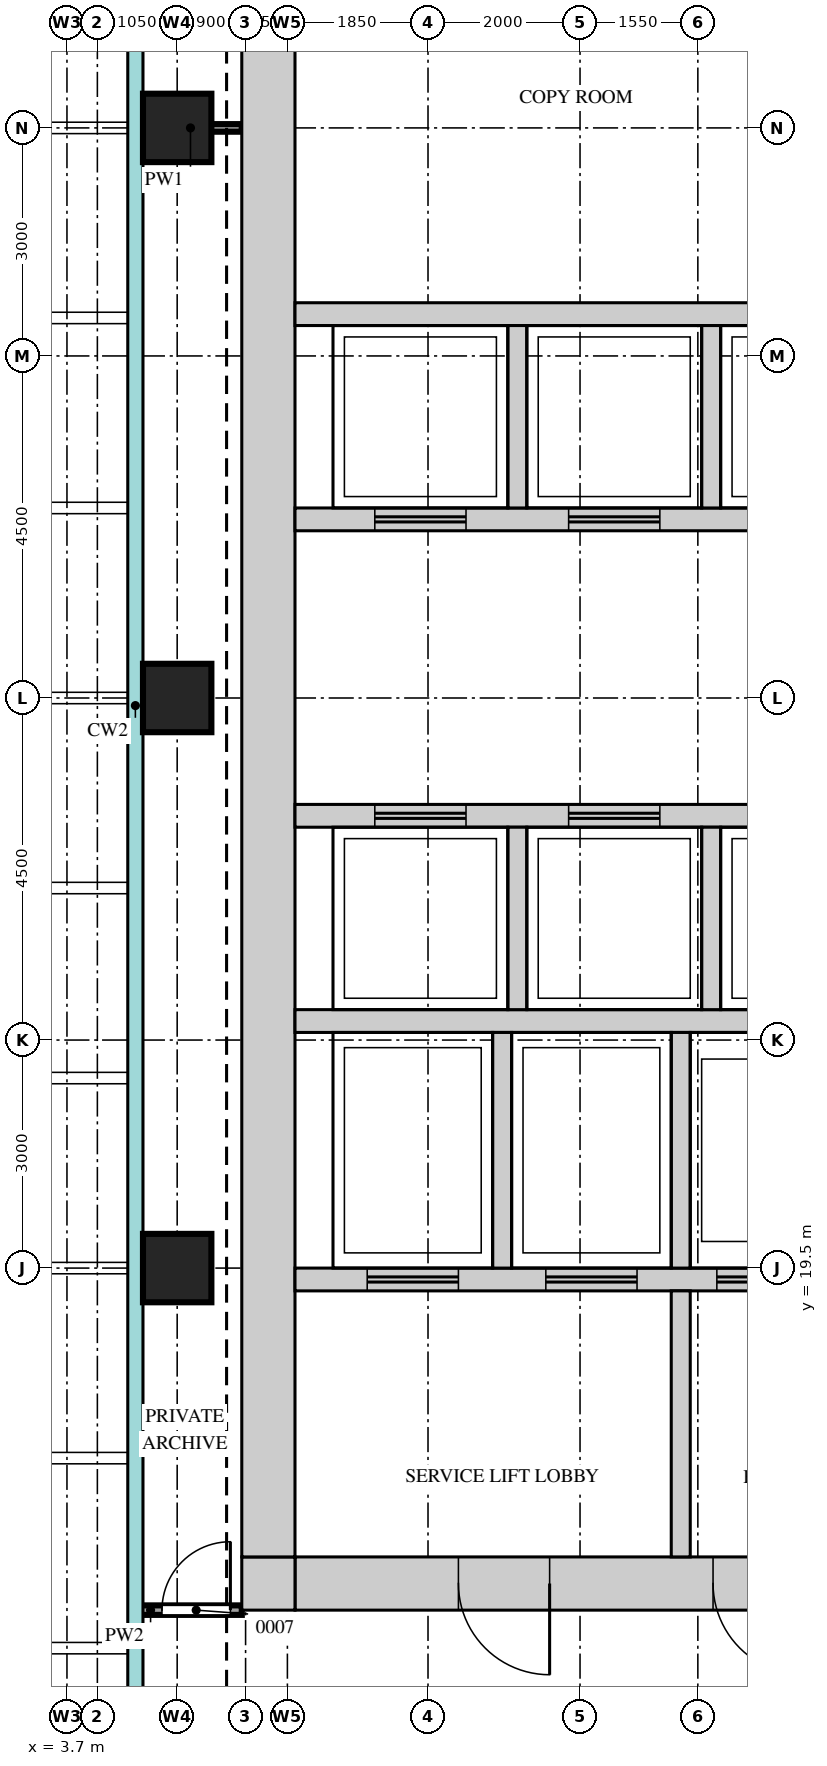
"""IFC4 building model, lengths in metres.
Left out: names, types, materials, properties, quantities, classifications, styles, units other than length and angle.
Written with IfcOpenShell. Run it as: python <this file> out.ifc"""

import sys

from ifc_helpers import new_model, si_unit, direction, frame, frame_2d, origin, origin_2d, place, context, subcontext, project, spatial, rectangle, extrude, source, transform, mapped, element, fill, save


model = new_model("IFC4")
c1 = context("Model", 3, precision=1e-05, world=origin(), true_north=direction((0.0, 1.0)))
c2 = subcontext(c1, "Body", "Model", "MODEL_VIEW")
j1 = project(units=[si_unit("LENGTHUNIT", "METRE"), si_unit("PLANEANGLEUNIT", "RADIAN")], contexts=[c1])
p1 = place(None, origin())
s1 = spatial("IfcSite", under=j1, at=p1, CompositionType="ELEMENT")
p2 = place(p1, origin())
s2 = spatial("IfcBuilding", under=s1, at=p2, CompositionType="ELEMENT")
p3 = place(p2, frame((0.0, 0.0, 266.2)))
s3 = spatial("IfcBuildingStorey", under=s2, at=p3, CompositionType="ELEMENT", Elevation=266.2)
m1 = source(origin(), c2, "Body", "SweptSolid", [
    extrude(rectangle(XDim=13.6, YDim=0.7, at=frame_2d((6.8, 0.0))), origin(), (0.0, 0.0, 1.0), 3.75),
])
p4 = place(p3, frame((6.7, 15.35, 0.0), z_axis=(0.0, 0.0, 1.0), x_axis=(1.0, 0.0, 0.0)))
e1 = element("IfcWall", 1, at=p4, inside=s3, PredefinedType="SHEAR", context=c2, shape_type="MappedRepresentation", body=[
    mapped(m1, transform((0.0, 0.0, 0.0))),
])
m2 = source(origin(), c2, "Body", "SweptSolid", [
    extrude(rectangle(XDim=1.2, YDim=2.1, at=frame_2d((0.6, 1.05))), frame((0.0, 0.36, 0.0), z_axis=(0.0, -1.0, 0.0), x_axis=(1.0, 0.0, 0.0)), (0.0, 0.0, 1.0), 0.72),
])
p5 = place(p4, frame((5.5, 0.0, 0.0)))
e2 = element("IfcOpeningElement", 2, at=p5, cuts=e1, PredefinedType="OPENING", context=c2, shape_type="MappedRepresentation", body=[
    mapped(m2, transform((0.0, 0.0, 0.0))),
])
p6 = place(p4, frame((2.15, 0.0, 0.0)))
e3 = element("IfcOpeningElement", 3, at=p6, cuts=e1, PredefinedType="OPENING", context=c2, shape_type="MappedRepresentation", body=[
    mapped(m2, transform((0.0, 0.0, 0.0))),
])
m3 = source(origin(), c2, "Body", "SweptSolid", [
    extrude(rectangle(XDim=1.0, YDim=2.1, at=frame_2d((0.5, 1.05))), frame((0.0, 0.36, 0.0), z_axis=(0.0, -1.0, 0.0), x_axis=(1.0, 0.0, 0.0)), (0.0, 0.0, 1.0), 0.72),
])
p7 = place(p4, frame((8.0, 0.0, 0.0)))
e4 = element("IfcOpeningElement", 4, at=p7, cuts=e1, PredefinedType="OPENING", context=c2, shape_type="MappedRepresentation", body=[
    mapped(m3, transform((0.0, 0.0, 0.0))),
])
m4 = source(origin(), c2, "Body", "SweptSolid", [
    extrude(rectangle(XDim=0.7, YDim=0.7, at=frame_2d((0.35, 0.0))), origin(), (0.0, 0.0, 1.0), 3.75),
])
p8 = place(p3, frame((6.0, 15.35, 0.0), z_axis=(0.0, 0.0, 1.0), x_axis=(1.0, 0.0, 0.0)))
e5 = element("IfcWall", 5, at=p8, inside=s3, PredefinedType="SHEAR", context=c2, shape_type="MappedRepresentation", body=[
    mapped(m4, transform((0.0, 0.0, 0.0))),
])
m5 = source(origin(), c2, "Body", "SweptSolid", [
    extrude(rectangle(XDim=22.6, YDim=0.7, at=frame_2d((11.3, 0.0))), origin(), (0.0, 0.0, 1.0), 3.75),
])
p9 = place(p3, frame((6.35, 15.7, 0.0), z_axis=(0.0, 0.0, 1.0), x_axis=(0.0, 1.0, 0.0)))
e6 = element("IfcWall", 6, at=p9, inside=s3, PredefinedType="SHEAR", context=c2, shape_type="MappedRepresentation", body=[
    mapped(m5, transform((0.0, 0.0, 0.0))),
])
m6 = source(origin(), c2, "Body", "SweptSolid", [
    extrude(rectangle(XDim=13.6, YDim=0.3, at=frame_2d((6.8, 0.0))), origin(), (0.0, 0.0, 1.0), 3.75),
])
p10 = place(p3, frame((6.7, 22.75, 0.0), z_axis=(0.0, 0.0, 1.0), x_axis=(1.0, 0.0, 0.0)))
e7 = element("IfcWall", 7, at=p10, inside=s3, PredefinedType="STANDARD", context=c2, shape_type="MappedRepresentation", body=[
    mapped(m6, transform((0.0, 0.0, 0.0))),
])
m7 = source(origin(), c2, "Body", "SweptSolid", [
    extrude(rectangle(XDim=9.375, YDim=0.3, at=frame_2d((4.688, 0.0))), origin(), (0.0, 0.0, 1.0), 3.75),
])
p11 = place(p3, frame((6.7, 19.35, 0.0), z_axis=(0.0, 0.0, 1.0), x_axis=(1.0, 0.0, 0.0)))
e8 = element("IfcWall", 8, at=p11, inside=s3, PredefinedType="STANDARD", context=c2, shape_type="MappedRepresentation", body=[
    mapped(m7, transform((0.0, 0.0, 0.0))),
])
m8 = source(origin(), c2, "Body", "SweptSolid", [
    extrude(rectangle(XDim=1.2, YDim=2.1, at=frame_2d((0.6, 1.05))), frame((0.0, 0.16, 0.0), z_axis=(0.0, -1.0, 0.0), x_axis=(1.0, 0.0, 0.0)), (0.0, 0.0, 1.0), 0.32),
])
p12 = place(p11, frame((0.95, 0.0, 0.0)))
e9 = element("IfcOpeningElement", 9, at=p12, cuts=e8, PredefinedType="OPENING", context=c2, shape_type="MappedRepresentation", body=[
    mapped(m8, transform((0.0, 0.0, 0.0))),
])
p13 = place(p11, frame((3.3, 0.0, 0.0)))
e10 = element("IfcOpeningElement", 10, at=p13, cuts=e8, PredefinedType="OPENING", context=c2, shape_type="MappedRepresentation", body=[
    mapped(m8, transform((0.0, 0.0, 0.0))),
])
p14 = place(p11, frame((5.55, 0.0, 0.0)))
e11 = element("IfcOpeningElement", 11, at=p14, cuts=e8, PredefinedType="OPENING", context=c2, shape_type="MappedRepresentation", body=[
    mapped(m8, transform((0.0, 0.0, 0.0))),
])
p15 = place(p11, frame((7.7, 0.0, 0.0)))
e12 = element("IfcOpeningElement", 12, at=p15, cuts=e8, PredefinedType="OPENING", context=c2, shape_type="MappedRepresentation", body=[
    mapped(m8, transform((0.0, 0.0, 0.0))),
])
m9 = source(origin(), c2, "Body", "SweptSolid", [
    extrude(rectangle(XDim=8.15, YDim=0.3, at=frame_2d((4.075, 0.0))), origin(), (0.0, 0.0, 1.0), 3.75),
])
p16 = place(p3, frame((6.7, 32.05, 0.0), z_axis=(0.0, 0.0, 1.0), x_axis=(1.0, 0.0, 0.0)))
e13 = element("IfcWall", 13, at=p16, inside=s3, PredefinedType="STANDARD", context=c2, shape_type="MappedRepresentation", body=[
    mapped(m9, transform((0.0, 0.0, 0.0))),
])
p17 = place(p3, frame((6.7, 29.35, 0.0), z_axis=(0.0, 0.0, 1.0), x_axis=(1.0, 0.0, 0.0)))
e14 = element("IfcWall", 14, at=p17, inside=s3, PredefinedType="STANDARD", context=c2, shape_type="MappedRepresentation", body=[
    mapped(m9, transform((0.0, 0.0, 0.0))),
])
p18 = place(p17, frame((1.05, 0.0, 0.0)))
e15 = element("IfcOpeningElement", 15, at=p18, cuts=e14, PredefinedType="OPENING", context=c2, shape_type="MappedRepresentation", body=[
    mapped(m8, transform((0.0, 0.0, 0.0))),
])
p19 = place(p17, frame((3.6, 0.0, 0.0)))
e16 = element("IfcOpeningElement", 16, at=p19, cuts=e14, PredefinedType="OPENING", context=c2, shape_type="MappedRepresentation", body=[
    mapped(m8, transform((0.0, 0.0, 0.0))),
])
p20 = place(p17, frame((6.15, 0.0, 0.0)))
e17 = element("IfcOpeningElement", 17, at=p20, cuts=e14, PredefinedType="OPENING", context=c2, shape_type="MappedRepresentation", body=[
    mapped(m8, transform((0.0, 0.0, 0.0))),
])
p21 = place(p3, frame((6.7, 25.45, 0.0), z_axis=(0.0, 0.0, 1.0), x_axis=(1.0, 0.0, 0.0)))
e18 = element("IfcWall", 18, at=p21, inside=s3, PredefinedType="STANDARD", context=c2, shape_type="MappedRepresentation", body=[
    mapped(m9, transform((0.0, 0.0, 0.0))),
])
p22 = place(p21, frame((1.05, 0.0, 0.0)))
e19 = element("IfcOpeningElement", 19, at=p22, cuts=e18, PredefinedType="OPENING", context=c2, shape_type="MappedRepresentation", body=[
    mapped(m8, transform((0.0, 0.0, 0.0))),
])
p23 = place(p21, frame((3.6, 0.0, 0.0)))
e20 = element("IfcOpeningElement", 20, at=p23, cuts=e18, PredefinedType="OPENING", context=c2, shape_type="MappedRepresentation", body=[
    mapped(m8, transform((0.0, 0.0, 0.0))),
])
p24 = place(p21, frame((6.15, 0.0, 0.0)))
e21 = element("IfcOpeningElement", 21, at=p24, cuts=e18, PredefinedType="OPENING", context=c2, shape_type="MappedRepresentation", body=[
    mapped(m8, transform((0.0, 0.0, 0.0))),
])
m10 = source(origin(), c2, "Body", "SweptSolid", [
    extrude(rectangle(XDim=3.1, YDim=0.25, at=frame_2d((1.55, 0.0))), origin(), (0.0, 0.0, 1.0), 3.75),
])
for number, where, z_axis, x_axis in (
    (22, (9.425, 19.5, 0.0), (0.0, 0.0, 1.0), (0.0, 1.0, 0.0)),
    (23, (11.775, 19.5, 0.0), (0.0, 0.0, 1.0), (0.0, 1.0, 0.0)),
):
    element("IfcWall", number, at=place(p3, frame(where, z_axis=z_axis, x_axis=x_axis)), inside=s3, PredefinedType="STANDARD", context=c2, shape_type="MappedRepresentation", body=[
        mapped(m10, transform((0.0, 0.0, 0.0))),
    ])
m11 = source(origin(), c2, "Body", "SweptSolid", [
    extrude(rectangle(XDim=2.4, YDim=0.25, at=frame_2d((1.2, 0.0))), origin(), (0.0, 0.0, 1.0), 3.75),
])
for number, where, z_axis, x_axis in (
    (24, (9.625, 29.5, 0.0), (0.0, 0.0, 1.0), (0.0, 1.0, 0.0)),
    (25, (12.175, 29.5, 0.0), (0.0, 0.0, 1.0), (0.0, 1.0, 0.0)),
):
    element("IfcWall", number, at=place(p3, frame(where, z_axis=z_axis, x_axis=x_axis)), inside=s3, PredefinedType="STANDARD", context=c2, shape_type="MappedRepresentation", body=[
        mapped(m11, transform((0.0, 0.0, 0.0))),
    ])
m12 = source(origin(), c2, "Body", "SweptSolid", [
    extrude(rectangle(XDim=2.4, YDim=0.25, at=frame_2d((1.2, 0.0))), origin(), (0.0, 0.0, 1.0), 3.75),
])
for number, where, z_axis, x_axis in (
    (26, (9.625, 22.9, 0.0), (0.0, 0.0, 1.0), (0.0, 1.0, 0.0)),
    (27, (12.175, 22.9, 0.0), (0.0, 0.0, 1.0), (0.0, 1.0, 0.0)),
):
    element("IfcWall", number, at=place(p3, frame(where, z_axis=z_axis, x_axis=x_axis)), inside=s3, PredefinedType="STANDARD", context=c2, shape_type="MappedRepresentation", body=[
        mapped(m12, transform((0.0, 0.0, 0.0))),
    ])
m13 = source(origin(), c2, "Body", "SweptSolid", [
    extrude(rectangle(XDim=3.5, YDim=0.25, at=frame_2d((1.75, 0.0))), origin(), (0.0, 0.0, 1.0), 3.75),
])
p25 = place(p3, frame((11.775, 15.7, 0.0), z_axis=(0.0, 0.0, 1.0), x_axis=(0.0, 1.0, 0.0)))
e28 = element("IfcWall", 28, at=p25, inside=s3, PredefinedType="STANDARD", context=c2, shape_type="MappedRepresentation", body=[
    mapped(m13, transform((0.0, 0.0, 0.0))),
])
m14 = source(origin(), c2, "Body", "SweptSolid", [
    extrude(rectangle(XDim=0.9, YDim=0.9, at=origin_2d()), origin(), (0.0, 0.0, 1.0), 3.75),
])
for number, where, z_axis, x_axis in (
    (29, (5.15, 19.5, 0.0), (0.0, 0.0, 1.0), (1.0, 0.0, 0.0)),
    (30, (5.15, 27.0, 0.0), (0.0, 0.0, 1.0), (1.0, 0.0, 0.0)),
    (31, (5.15, 34.5, 0.0), (0.0, 0.0, 1.0), (1.0, 0.0, 0.0)),
):
    element("IfcColumn", number, at=place(p3, frame(where, z_axis=z_axis, x_axis=x_axis)), inside=s3, PredefinedType="COLUMN", context=c2, shape_type="MappedRepresentation", body=[
        mapped(m14, transform((0.0, 0.0, 0.0))),
    ])
m15 = source(origin(), c2, "Body", "SweptSolid", [
    extrude(rectangle(XDim=1.35, YDim=0.125, at=frame_2d((0.675, 0.0))), origin(), (0.0, 0.0, 1.0), 3.8),
])
p26 = place(p3, frame((4.65, 15.0, 0.0), z_axis=(0.0, 0.0, 1.0), x_axis=(1.0, 0.0, 0.0)))
e32 = element("IfcWall", 32, at=p26, inside=s3, PredefinedType="PARTITIONING", context=c2, shape_type="MappedRepresentation", body=[
    mapped(m15, transform((0.0, 0.0, 0.0))),
])
m16 = source(origin(), c2, "Body", "SweptSolid", [
    extrude(rectangle(XDim=0.9, YDim=2.1, at=frame_2d((0.45, 1.05))), frame((0.0, 0.073, 0.0), z_axis=(0.0, -1.0, 0.0), x_axis=(1.0, 0.0, 0.0)), (0.0, 0.0, 1.0), 0.145),
])
p27 = place(p26, frame((0.3, 0.0, 0.0)))
e33 = element("IfcOpeningElement", 33, at=p27, cuts=e32, PredefinedType="OPENING", context=c2, shape_type="MappedRepresentation", body=[
    mapped(m16, transform((0.0, 0.0, 0.0))),
])
m17 = source(origin(), c2, "Body", "SweptSolid", [
    extrude(rectangle(XDim=1.35, YDim=0.1, at=frame_2d((0.675, 0.0))), origin(), (0.0, 0.0, 1.0), 3.8),
])
p28 = place(p3, frame((4.65, 34.5, 0.0), z_axis=(0.0, 0.0, 1.0), x_axis=(1.0, 0.0, 0.0)))
e34 = element("IfcWall", 34, at=p28, inside=s3, PredefinedType="PARTITIONING", context=c2, shape_type="MappedRepresentation", body=[
    mapped(m17, transform((0.0, 0.0, 0.0))),
])
m18 = source(origin(), c2, "Body", "SweptSolid", [
    extrude(rectangle(XDim=1.2, YDim=2.1, at=frame_2d((0.6, 1.05))), frame((0.0, 0.3, 0.0), z_axis=(0.0, -1.0, 0.0), x_axis=(1.0, 0.0, 0.0)), (0.0, 0.0, 1.0), 0.6),
])
p29 = place(p5, origin())
e35 = element("IfcDoor", 35, at=p29, inside=s3, OperationType="SINGLE_SWING_RIGHT", PredefinedType="DOOR", context=c2, shape_type="MappedRepresentation", body=[
    mapped(m18, transform((0.0, 0.0, 0.0))),
])
fill(e2, e35)
p30 = place(p6, origin())
e36 = element("IfcDoor", 36, at=p30, inside=s3, OperationType="SINGLE_SWING_RIGHT", PredefinedType="DOOR", context=c2, shape_type="MappedRepresentation", body=[
    mapped(m18, transform((0.0, 0.0, 0.0))),
])
fill(e3, e36)
m19 = source(origin(), c2, "Body", "SweptSolid", [
    extrude(rectangle(XDim=0.9, YDim=2.1, at=frame_2d((0.45, 1.05))), frame((0.0, 0.025, 0.0), z_axis=(0.0, -1.0, 0.0), x_axis=(1.0, 0.0, 0.0)), (0.0, 0.0, 1.0), 0.05),
])
p31 = place(p27, origin())
e37 = element("IfcDoor", 37, at=p31, inside=s3, OperationType="SINGLE_SWING_LEFT", PredefinedType="DOOR", context=c2, shape_type="MappedRepresentation", body=[
    mapped(m19, transform((0.0, 0.0, 0.0))),
])
fill(e33, e37)
m20 = source(origin(), c2, "Body", "SweptSolid", [
    extrude(rectangle(XDim=1.2, YDim=2.1, at=frame_2d((0.6, 1.05))), frame((0.0, 0.025, 0.0), z_axis=(0.0, -1.0, 0.0), x_axis=(1.0, 0.0, 0.0)), (0.0, 0.0, 1.0), 0.05),
])
p32 = place(p22, origin())
e38 = element("IfcDoor", 38, at=p32, inside=s3, OperationType="DOUBLE_DOOR_SLIDING", PredefinedType="DOOR", context=c2, shape_type="MappedRepresentation", body=[
    mapped(m20, transform((0.0, 0.0, 0.0))),
])
fill(e19, e38)
p33 = place(p23, origin())
e39 = element("IfcDoor", 39, at=p33, inside=s3, OperationType="DOUBLE_DOOR_SLIDING", PredefinedType="DOOR", context=c2, shape_type="MappedRepresentation", body=[
    mapped(m20, transform((0.0, 0.0, 0.0))),
])
fill(e20, e39)
p34 = place(p18, origin())
e40 = element("IfcDoor", 40, at=p34, inside=s3, OperationType="DOUBLE_DOOR_SLIDING", PredefinedType="DOOR", context=c2, shape_type="MappedRepresentation", body=[
    mapped(m20, transform((0.0, 0.0, 0.0))),
])
fill(e15, e40)
p35 = place(p19, origin())
e41 = element("IfcDoor", 41, at=p35, inside=s3, OperationType="DOUBLE_DOOR_SLIDING", PredefinedType="DOOR", context=c2, shape_type="MappedRepresentation", body=[
    mapped(m20, transform((0.0, 0.0, 0.0))),
])
fill(e16, e41)
p36 = place(p12, origin())
e42 = element("IfcDoor", 42, at=p36, inside=s3, OperationType="DOUBLE_DOOR_SLIDING", PredefinedType="DOOR", context=c2, shape_type="MappedRepresentation", body=[
    mapped(m20, transform((0.0, 0.0, 0.0))),
])
fill(e9, e42)
p37 = place(p13, origin())
e43 = element("IfcDoor", 43, at=p37, inside=s3, OperationType="DOUBLE_DOOR_SLIDING", PredefinedType="DOOR", context=c2, shape_type="MappedRepresentation", body=[
    mapped(m20, transform((0.0, 0.0, 0.0))),
])
fill(e10, e43)
p38 = place(p14, origin())
e44 = element("IfcDoor", 44, at=p38, inside=s3, OperationType="DOUBLE_DOOR_SLIDING", PredefinedType="DOOR", context=c2, shape_type="MappedRepresentation", body=[
    mapped(m20, transform((0.0, 0.0, 0.0))),
])
fill(e11, e44)
save(model, sys.argv[1])
